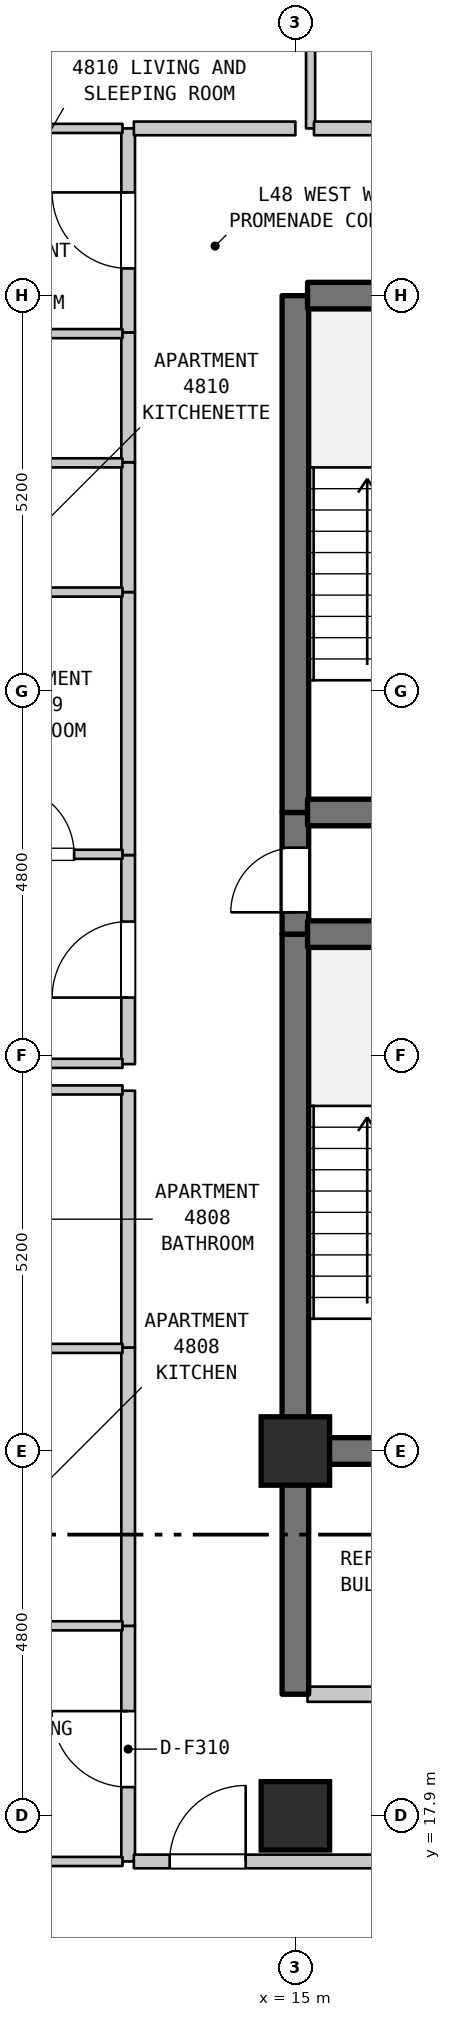
"""IFC4 building model, lengths in metres.
Left out: names, types, materials, properties, quantities, classifications, styles, units other than length and angle.
Written with IfcOpenShell. Run it as: python <this file> out.ifc"""

import sys

from ifc_helpers import new_model, si_unit, direction, frame, frame_2d, origin, origin_2d, place, context, subcontext, project, spatial, rectangle, extrude, element, fill, save


model = new_model("IFC4")
c1 = context("Model", 3, precision=1e-05, world=origin(), true_north=direction((0.0, 1.0)))
c2 = subcontext(c1, "Body", "Model", "MODEL_VIEW")
j1 = project(units=[si_unit("LENGTHUNIT", "METRE"), si_unit("PLANEANGLEUNIT", "RADIAN")], contexts=[c1])
p1 = place(None, origin())
s1 = spatial("IfcSite", under=j1, at=p1, CompositionType="ELEMENT")
p2 = place(p1, origin())
s2 = spatial("IfcBuilding", under=s1, at=p2, CompositionType="ELEMENT")
p3 = place(p2, frame((0.0, 0.0, 195.8)))
s3 = spatial("IfcBuildingStorey", under=s2, at=p3, CompositionType="ELEMENT", Elevation=195.8)
for number, where, z_axis, x_axis in (
    (1, (15.0, 17.9, 0.0), (0.0, 0.0, 1.0), (1.0, 0.0, 0.0)),
    (2, (15.0, 22.7, 0.0), (0.0, 0.0, 1.0), (1.0, 0.0, 0.0)),
):
    element("IfcColumn", number, at=place(p3, frame(where, z_axis=z_axis, x_axis=x_axis)), inside=s3, PredefinedType="COLUMN", context=c2, shape_type="SweptSolid", body=[
        extrude(rectangle(XDim=0.9, YDim=0.9, at=origin_2d()), origin(), (0.0, 0.0, 1.0), 3.7),
    ])
p4 = place(p3, frame((12.8, 17.3, 0.0), z_axis=(0.0, 0.0, 1.0), x_axis=(0.0, 1.0, 0.0)))
e3 = element("IfcWall", 3, at=p4, inside=s3, PredefinedType="STANDARD", context=c2, shape_type="SweptSolid", body=[
    extrude(rectangle(XDim=3.1, YDim=0.18, at=frame_2d((1.55, 0.0))), origin(), (0.0, 0.0, 1.0), 3.39),
])
p5 = place(p4, frame((0.978, 0.0, 0.0)))
e4 = element("IfcOpeningElement", 4, at=p5, cuts=e3, PredefinedType="OPENING", context=c2, shape_type="SweptSolid", body=[
    extrude(rectangle(XDim=1.0, YDim=2.15, at=frame_2d((0.5, 1.075))), frame((0.0, 0.1, 0.0), z_axis=(0.0, -1.0, 0.0), x_axis=(1.0, 0.0, 0.0)), (0.0, 0.0, 1.0), 0.2),
])
p6 = place(p3, frame((12.8, 20.4, 0.0), z_axis=(0.0, 0.0, 1.0), x_axis=(0.0, 1.0, 0.0)))
e5 = element("IfcWall", 5, at=p6, inside=s3, PredefinedType="STANDARD", context=c2, shape_type="SweptSolid", body=[
    extrude(rectangle(XDim=3.661, YDim=0.18, at=frame_2d((1.831, 0.0))), origin(), (0.0, 0.0, 1.0), 3.39),
])
p7 = place(p3, frame((12.8, 24.061, 0.0), z_axis=(0.0, 0.0, 1.0), x_axis=(0.0, 1.0, 0.0)))
e6 = element("IfcWall", 6, at=p7, inside=s3, PredefinedType="STANDARD", context=c2, shape_type="SweptSolid", body=[
    extrude(rectangle(XDim=3.379, YDim=0.18, at=frame_2d((1.689, 0.0))), origin(), (0.0, 0.0, 1.0), 3.39),
])
p8 = place(p3, frame((12.8, 27.79, 0.0), z_axis=(0.0, 0.0, 1.0), x_axis=(0.0, 1.0, 0.0)))
e7 = element("IfcWall", 7, at=p8, inside=s3, PredefinedType="STANDARD", context=c2, shape_type="SweptSolid", body=[
    extrude(rectangle(XDim=2.75, YDim=0.18, at=frame_2d((1.375, 0.0))), origin(), (0.0, 0.0, 1.0), 3.39),
])
p9 = place(p8, frame((0.875, 0.0, 0.0)))
e8 = element("IfcOpeningElement", 8, at=p9, cuts=e7, PredefinedType="OPENING", context=c2, shape_type="SweptSolid", body=[
    extrude(rectangle(XDim=1.0, YDim=2.15, at=frame_2d((0.5, 1.075))), frame((0.0, 0.1, 0.0), z_axis=(0.0, -1.0, 0.0), x_axis=(1.0, 0.0, 0.0)), (0.0, 0.0, 1.0), 0.2),
])
p10 = place(p3, frame((12.8, 30.54, 0.0), z_axis=(0.0, 0.0, 1.0), x_axis=(0.0, 1.0, 0.0)))
e9 = element("IfcWall", 9, at=p10, inside=s3, PredefinedType="STANDARD", context=c2, shape_type="SweptSolid", body=[
    extrude(rectangle(XDim=3.46, YDim=0.18, at=frame_2d((1.73, 0.0))), origin(), (0.0, 0.0, 1.0), 3.39),
])
for number, where, z_axis, x_axis in (
    (10, (12.8, 34.0, 0.0), (0.0, 0.0, 1.0), (0.0, 1.0, 0.0)),
    (11, (12.8, 35.708, 0.0), (0.0, 0.0, 1.0), (0.0, 1.0, 0.0)),
):
    element("IfcWall", number, at=place(p3, frame(where, z_axis=z_axis, x_axis=x_axis)), inside=s3, PredefinedType="STANDARD", context=c2, shape_type="SweptSolid", body=[
        extrude(rectangle(XDim=1.708, YDim=0.18, at=frame_2d((0.854, 0.0))), origin(), (0.0, 0.0, 1.0), 3.39),
    ])
p11 = place(p3, frame((12.8, 37.416, 0.0), z_axis=(0.0, 0.0, 1.0), x_axis=(0.0, 1.0, 0.0)))
e12 = element("IfcWall", 12, at=p11, inside=s3, PredefinedType="STANDARD", context=c2, shape_type="SweptSolid", body=[
    extrude(rectangle(XDim=2.684, YDim=0.18, at=frame_2d((1.342, 0.0))), origin(), (0.0, 0.0, 1.0), 3.39),
])
p12 = place(p11, frame((0.842, 0.0, 0.0)))
e13 = element("IfcOpeningElement", 13, at=p12, cuts=e12, PredefinedType="OPENING", context=c2, shape_type="SweptSolid", body=[
    extrude(rectangle(XDim=1.0, YDim=2.15, at=frame_2d((0.5, 1.075))), frame((0.0, 0.1, 0.0), z_axis=(0.0, -1.0, 0.0), x_axis=(1.0, 0.0, 0.0)), (0.0, 0.0, 1.0), 0.2),
])
p13 = place(p3, frame((15.0, 19.5, 0.0), z_axis=(0.0, 0.0, 1.0), x_axis=(0.0, 1.0, 0.0)))
e14 = element("IfcWall", 14, at=p13, inside=s3, PredefinedType="SHEAR", context=c2, shape_type="SweptSolid", body=[
    extrude(rectangle(XDim=3.2, YDim=0.35, at=frame_2d((1.6, 0.0))), origin(), (0.0, 0.0, 1.0), 3.39),
])
p14 = place(p3, frame((15.0, 22.7, 0.0), z_axis=(0.0, 0.0, 1.0), x_axis=(0.0, 1.0, 0.0)))
e15 = element("IfcWall", 15, at=p14, inside=s3, PredefinedType="SHEAR", context=c2, shape_type="SweptSolid", body=[
    extrude(rectangle(XDim=6.8, YDim=0.35, at=frame_2d((3.4, 0.0))), origin(), (0.0, 0.0, 1.0), 3.39),
])
p15 = place(p3, frame((15.0, 29.5, 0.0), z_axis=(0.0, 0.0, 1.0), x_axis=(0.0, 1.0, 0.0)))
e16 = element("IfcWall", 16, at=p15, inside=s3, PredefinedType="SHEAR", context=c2, shape_type="SweptSolid", body=[
    extrude(rectangle(XDim=1.6, YDim=0.35, at=frame_2d((0.8, 0.0))), origin(), (0.0, 0.0, 1.0), 3.39),
])
p16 = place(p15, frame((0.287, 0.0, 0.0)))
e17 = element("IfcOpeningElement", 17, at=p16, cuts=e16, PredefinedType="OPENING", context=c2, shape_type="SweptSolid", body=[
    extrude(rectangle(XDim=0.85, YDim=2.1, at=frame_2d((0.425, 1.05))), frame((0.0, 0.185, 0.0), z_axis=(0.0, -1.0, 0.0), x_axis=(1.0, 0.0, 0.0)), (0.0, 0.0, 1.0), 0.37),
])
p17 = place(p3, frame((15.0, 31.1, 0.0), z_axis=(0.0, 0.0, 1.0), x_axis=(0.0, 1.0, 0.0)))
e18 = element("IfcWall", 18, at=p17, inside=s3, PredefinedType="SHEAR", context=c2, shape_type="SweptSolid", body=[
    extrude(rectangle(XDim=6.8, YDim=0.35, at=frame_2d((3.4, 0.0))), origin(), (0.0, 0.0, 1.0), 3.39),
])
p18 = place(p3, frame((15.2, 40.1, 0.0), z_axis=(0.0, 0.0, 1.0), x_axis=(0.0, 1.0, 0.0)))
e19 = element("IfcWall", 19, at=p18, inside=s3, PredefinedType="PARTITIONING", context=c2, shape_type="SweptSolid", body=[
    extrude(rectangle(XDim=3.2, YDim=0.12, at=frame_2d((1.6, 0.0))), origin(), (0.0, 0.0, 1.0), 3.39),
])
p19 = place(p3, frame((9.085, 17.3, 0.0), z_axis=(0.0, 0.0, 1.0), x_axis=(1.0, 0.0, 0.0)))
e20 = element("IfcWall", 20, at=p19, inside=s3, PredefinedType="PARTITIONING", context=c2, shape_type="SweptSolid", body=[
    extrude(rectangle(XDim=3.64, YDim=0.12, at=frame_2d((1.82, 0.0))), origin(), (0.0, 0.0, 1.0), 3.39),
])
p20 = place(p3, frame((12.875, 17.3, 0.0), z_axis=(0.0, 0.0, 1.0), x_axis=(1.0, 0.0, 0.0)))
e21 = element("IfcWall", 21, at=p20, inside=s3, PredefinedType="STANDARD", context=c2, shape_type="SweptSolid", body=[
    extrude(rectangle(XDim=3.28, YDim=0.18, at=frame_2d((1.64, 0.0))), origin(), (0.0, 0.0, 1.0), 3.39),
])
p21 = place(p20, frame((0.471, 0.0, 0.0)))
e22 = element("IfcOpeningElement", 22, at=p21, cuts=e21, PredefinedType="OPENING", context=c2, shape_type="SweptSolid", body=[
    extrude(rectangle(XDim=1.0, YDim=2.15, at=frame_2d((0.5, 1.075))), frame((0.0, 0.1, 0.0), z_axis=(0.0, -1.0, 0.0), x_axis=(1.0, 0.0, 0.0)), (0.0, 0.0, 1.0), 0.2),
])
p22 = place(p3, frame((15.16, 19.5, 0.0), z_axis=(0.0, 0.0, 1.0), x_axis=(1.0, 0.0, 0.0)))
e23 = element("IfcWall", 23, at=p22, inside=s3, PredefinedType="STANDARD", context=c2, shape_type="SweptSolid", body=[
    extrude(rectangle(XDim=3.68, YDim=0.2, at=frame_2d((1.84, 0.0))), origin(), (0.0, 0.0, 1.0), 3.39),
])
p23 = place(p22, frame((1.39, 0.0, 0.0)))
e24 = element("IfcOpeningElement", 24, at=p23, cuts=e23, PredefinedType="OPENING", context=c2, shape_type="SweptSolid", body=[
    extrude(rectangle(XDim=0.9, YDim=2.15, at=frame_2d((0.45, 1.075))), frame((0.0, 0.11, 0.0), z_axis=(0.0, -1.0, 0.0), x_axis=(1.0, 0.0, 0.0)), (0.0, 0.0, 1.0), 0.22),
])
p24 = place(p3, frame((10.595, 20.4, 0.0), z_axis=(0.0, 0.0, 1.0), x_axis=(1.0, 0.0, 0.0)))
e25 = element("IfcWall", 25, at=p24, inside=s3, PredefinedType="PARTITIONING", context=c2, shape_type="SweptSolid", body=[
    extrude(rectangle(XDim=2.13, YDim=0.12, at=frame_2d((1.065, 0.0))), origin(), (0.0, 0.0, 1.0), 3.39),
])
p25 = place(p3, frame((15.16, 22.7, 0.0), z_axis=(0.0, 0.0, 1.0), x_axis=(1.0, 0.0, 0.0)))
e26 = element("IfcWall", 26, at=p25, inside=s3, PredefinedType="SHEAR", context=c2, shape_type="SweptSolid", body=[
    extrude(rectangle(XDim=3.68, YDim=0.35, at=frame_2d((1.84, 0.0))), origin(), (0.0, 0.0, 1.0), 3.39),
])
for number, where, z_axis, x_axis in (
    (27, (10.595, 24.05, 0.0), (0.0, 0.0, 1.0), (1.0, 0.0, 0.0)),
    (28, (10.595, 27.45, 0.0), (0.0, 0.0, 1.0), (1.0, 0.0, 0.0)),
):
    element("IfcWall", number, at=place(p3, frame(where, z_axis=z_axis, x_axis=x_axis)), inside=s3, PredefinedType="PARTITIONING", context=c2, shape_type="SweptSolid", body=[
        extrude(rectangle(XDim=2.13, YDim=0.12, at=frame_2d((1.065, 0.0))), origin(), (0.0, 0.0, 1.0), 3.39),
    ])
p26 = place(p3, frame((9.03, 27.8, 0.0), z_axis=(0.0, 0.0, 1.0), x_axis=(1.0, 0.0, 0.0)))
e29 = element("IfcWall", 29, at=p26, inside=s3, PredefinedType="PARTITIONING", context=c2, shape_type="SweptSolid", body=[
    extrude(rectangle(XDim=3.695, YDim=0.12, at=frame_2d((1.848, 0.0))), origin(), (0.0, 0.0, 1.0), 3.39),
])
p27 = place(p3, frame((15.16, 29.5, 0.0), z_axis=(0.0, 0.0, 1.0), x_axis=(1.0, 0.0, 0.0)))
e30 = element("IfcWall", 30, at=p27, inside=s3, PredefinedType="SHEAR", context=c2, shape_type="SweptSolid", body=[
    extrude(rectangle(XDim=3.68, YDim=0.35, at=frame_2d((1.84, 0.0))), origin(), (0.0, 0.0, 1.0), 3.39),
])
p28 = place(p3, frame((10.523, 30.55, 0.0), z_axis=(0.0, 0.0, 1.0), x_axis=(1.0, 0.0, 0.0)))
e31 = element("IfcWall", 31, at=p28, inside=s3, PredefinedType="PARTITIONING", context=c2, shape_type="SweptSolid", body=[
    extrude(rectangle(XDim=2.202, YDim=0.12, at=frame_2d((1.101, 0.0))), origin(), (0.0, 0.0, 1.0), 3.39),
])
p29 = place(p28, frame((0.666, 0.0, 0.0)))
e32 = element("IfcOpeningElement", 32, at=p29, cuts=e31, PredefinedType="OPENING", context=c2, shape_type="SweptSolid", body=[
    extrude(rectangle(XDim=0.9, YDim=2.1, at=frame_2d((0.45, 1.05))), frame((0.0, 0.07, 0.0), z_axis=(0.0, -1.0, 0.0), x_axis=(1.0, 0.0, 0.0)), (0.0, 0.0, 1.0), 0.14),
])
p30 = place(p3, frame((15.16, 31.1, 0.0), z_axis=(0.0, 0.0, 1.0), x_axis=(1.0, 0.0, 0.0)))
e33 = element("IfcWall", 33, at=p30, inside=s3, PredefinedType="SHEAR", context=c2, shape_type="SweptSolid", body=[
    extrude(rectangle(XDim=3.68, YDim=0.35, at=frame_2d((1.84, 0.0))), origin(), (0.0, 0.0, 1.0), 3.39),
])
for number, where, z_axis, x_axis in (
    (34, (10.545, 34.0, 0.0), (0.0, 0.0, 1.0), (1.0, 0.0, 0.0)),
    (35, (10.545, 35.7, 0.0), (0.0, 0.0, 1.0), (1.0, 0.0, 0.0)),
    (36, (10.545, 37.4, 0.0), (0.0, 0.0, 1.0), (1.0, 0.0, 0.0)),
):
    element("IfcWall", number, at=place(p3, frame(where, z_axis=z_axis, x_axis=x_axis)), inside=s3, PredefinedType="PARTITIONING", context=c2, shape_type="SweptSolid", body=[
        extrude(rectangle(XDim=2.18, YDim=0.12, at=frame_2d((1.09, 0.0))), origin(), (0.0, 0.0, 1.0), 3.39),
    ])
p31 = place(p3, frame((15.16, 37.9, 0.0), z_axis=(0.0, 0.0, 1.0), x_axis=(1.0, 0.0, 0.0)))
e37 = element("IfcWall", 37, at=p31, inside=s3, PredefinedType="SHEAR", context=c2, shape_type="SweptSolid", body=[
    extrude(rectangle(XDim=3.68, YDim=0.35, at=frame_2d((1.84, 0.0))), origin(), (0.0, 0.0, 1.0), 3.39),
])
p32 = place(p3, frame((9.702, 40.1, 0.0), z_axis=(0.0, 0.0, 1.0), x_axis=(1.0, 0.0, 0.0)))
e38 = element("IfcWall", 38, at=p32, inside=s3, PredefinedType="PARTITIONING", context=c2, shape_type="SweptSolid", body=[
    extrude(rectangle(XDim=3.023, YDim=0.12, at=frame_2d((1.512, 0.0))), origin(), (0.0, 0.0, 1.0), 3.39),
])
p33 = place(p3, frame((12.875, 40.1, 0.0), z_axis=(0.0, 0.0, 1.0), x_axis=(1.0, 0.0, 0.0)))
e39 = element("IfcWall", 39, at=p33, inside=s3, PredefinedType="STANDARD", context=c2, shape_type="SweptSolid", body=[
    extrude(rectangle(XDim=2.125, YDim=0.18, at=frame_2d((1.062, 0.0))), origin(), (0.0, 0.0, 1.0), 3.39),
])
p34 = place(p3, frame((15.245, 40.1, 0.0), z_axis=(0.0, 0.0, 1.0), x_axis=(1.0, 0.0, 0.0)))
e40 = element("IfcWall", 40, at=p34, inside=s3, PredefinedType="STANDARD", context=c2, shape_type="SweptSolid", body=[
    extrude(rectangle(XDim=2.36, YDim=0.18, at=frame_2d((1.18, 0.0))), origin(), (0.0, 0.0, 1.0), 3.39),
])
p35 = place(p5, origin())
e41 = element("IfcDoor", 41, at=p35, inside=s3, OperationType="SINGLE_SWING_RIGHT", PredefinedType="DOOR", context=c2, shape_type="SweptSolid", body=[
    extrude(rectangle(XDim=1.0, YDim=2.15, at=frame_2d((0.5, 1.075))), frame((0.0, 0.025, 0.0), z_axis=(0.0, -1.0, 0.0), x_axis=(1.0, 0.0, 0.0)), (0.0, 0.0, 1.0), 0.05),
])
fill(e4, e41)
p36 = place(p9, origin())
e42 = element("IfcDoor", 42, at=p36, inside=s3, OperationType="SINGLE_SWING_LEFT", PredefinedType="DOOR", context=c2, shape_type="SweptSolid", body=[
    extrude(rectangle(XDim=1.0, YDim=2.15, at=frame_2d((0.5, 1.075))), frame((0.0, 0.025, 0.0), z_axis=(0.0, -1.0, 0.0), x_axis=(1.0, 0.0, 0.0)), (0.0, 0.0, 1.0), 0.05),
])
fill(e8, e42)
p37 = place(p12, origin())
e43 = element("IfcDoor", 43, at=p37, inside=s3, OperationType="SINGLE_SWING_RIGHT", PredefinedType="DOOR", context=c2, shape_type="SweptSolid", body=[
    extrude(rectangle(XDim=1.0, YDim=2.15, at=frame_2d((0.5, 1.075))), frame((0.0, 0.025, 0.0), z_axis=(0.0, -1.0, 0.0), x_axis=(1.0, 0.0, 0.0)), (0.0, 0.0, 1.0), 0.05),
])
fill(e13, e43)
p38 = place(p16, origin())
e44 = element("IfcDoor", 44, at=p38, inside=s3, OperationType="SINGLE_SWING_LEFT", PredefinedType="DOOR", context=c2, shape_type="SweptSolid", body=[
    extrude(rectangle(XDim=0.85, YDim=2.1, at=frame_2d((0.425, 1.05))), frame((0.0, 0.025, 0.0), z_axis=(0.0, -1.0, 0.0), x_axis=(1.0, 0.0, 0.0)), (0.0, 0.0, 1.0), 0.05),
])
fill(e17, e44)
p39 = place(p21, origin())
e45 = element("IfcDoor", 45, at=p39, inside=s3, OperationType="SINGLE_SWING_RIGHT", PredefinedType="DOOR", context=c2, shape_type="SweptSolid", body=[
    extrude(rectangle(XDim=1.0, YDim=2.15, at=frame_2d((0.5, 1.075))), frame((0.0, 0.025, 0.0), z_axis=(0.0, -1.0, 0.0), x_axis=(1.0, 0.0, 0.0)), (0.0, 0.0, 1.0), 0.05),
])
fill(e22, e45)
p40 = place(p29, origin())
e46 = element("IfcDoor", 46, at=p40, inside=s3, OperationType="SINGLE_SWING_LEFT", PredefinedType="DOOR", context=c2, shape_type="SweptSolid", body=[
    extrude(rectangle(XDim=0.9, YDim=2.1, at=frame_2d((0.45, 1.05))), frame((0.0, 0.025, 0.0), z_axis=(0.0, -1.0, 0.0), x_axis=(1.0, 0.0, 0.0)), (0.0, 0.0, 1.0), 0.05),
])
fill(e32, e46)
save(model, sys.argv[1])
